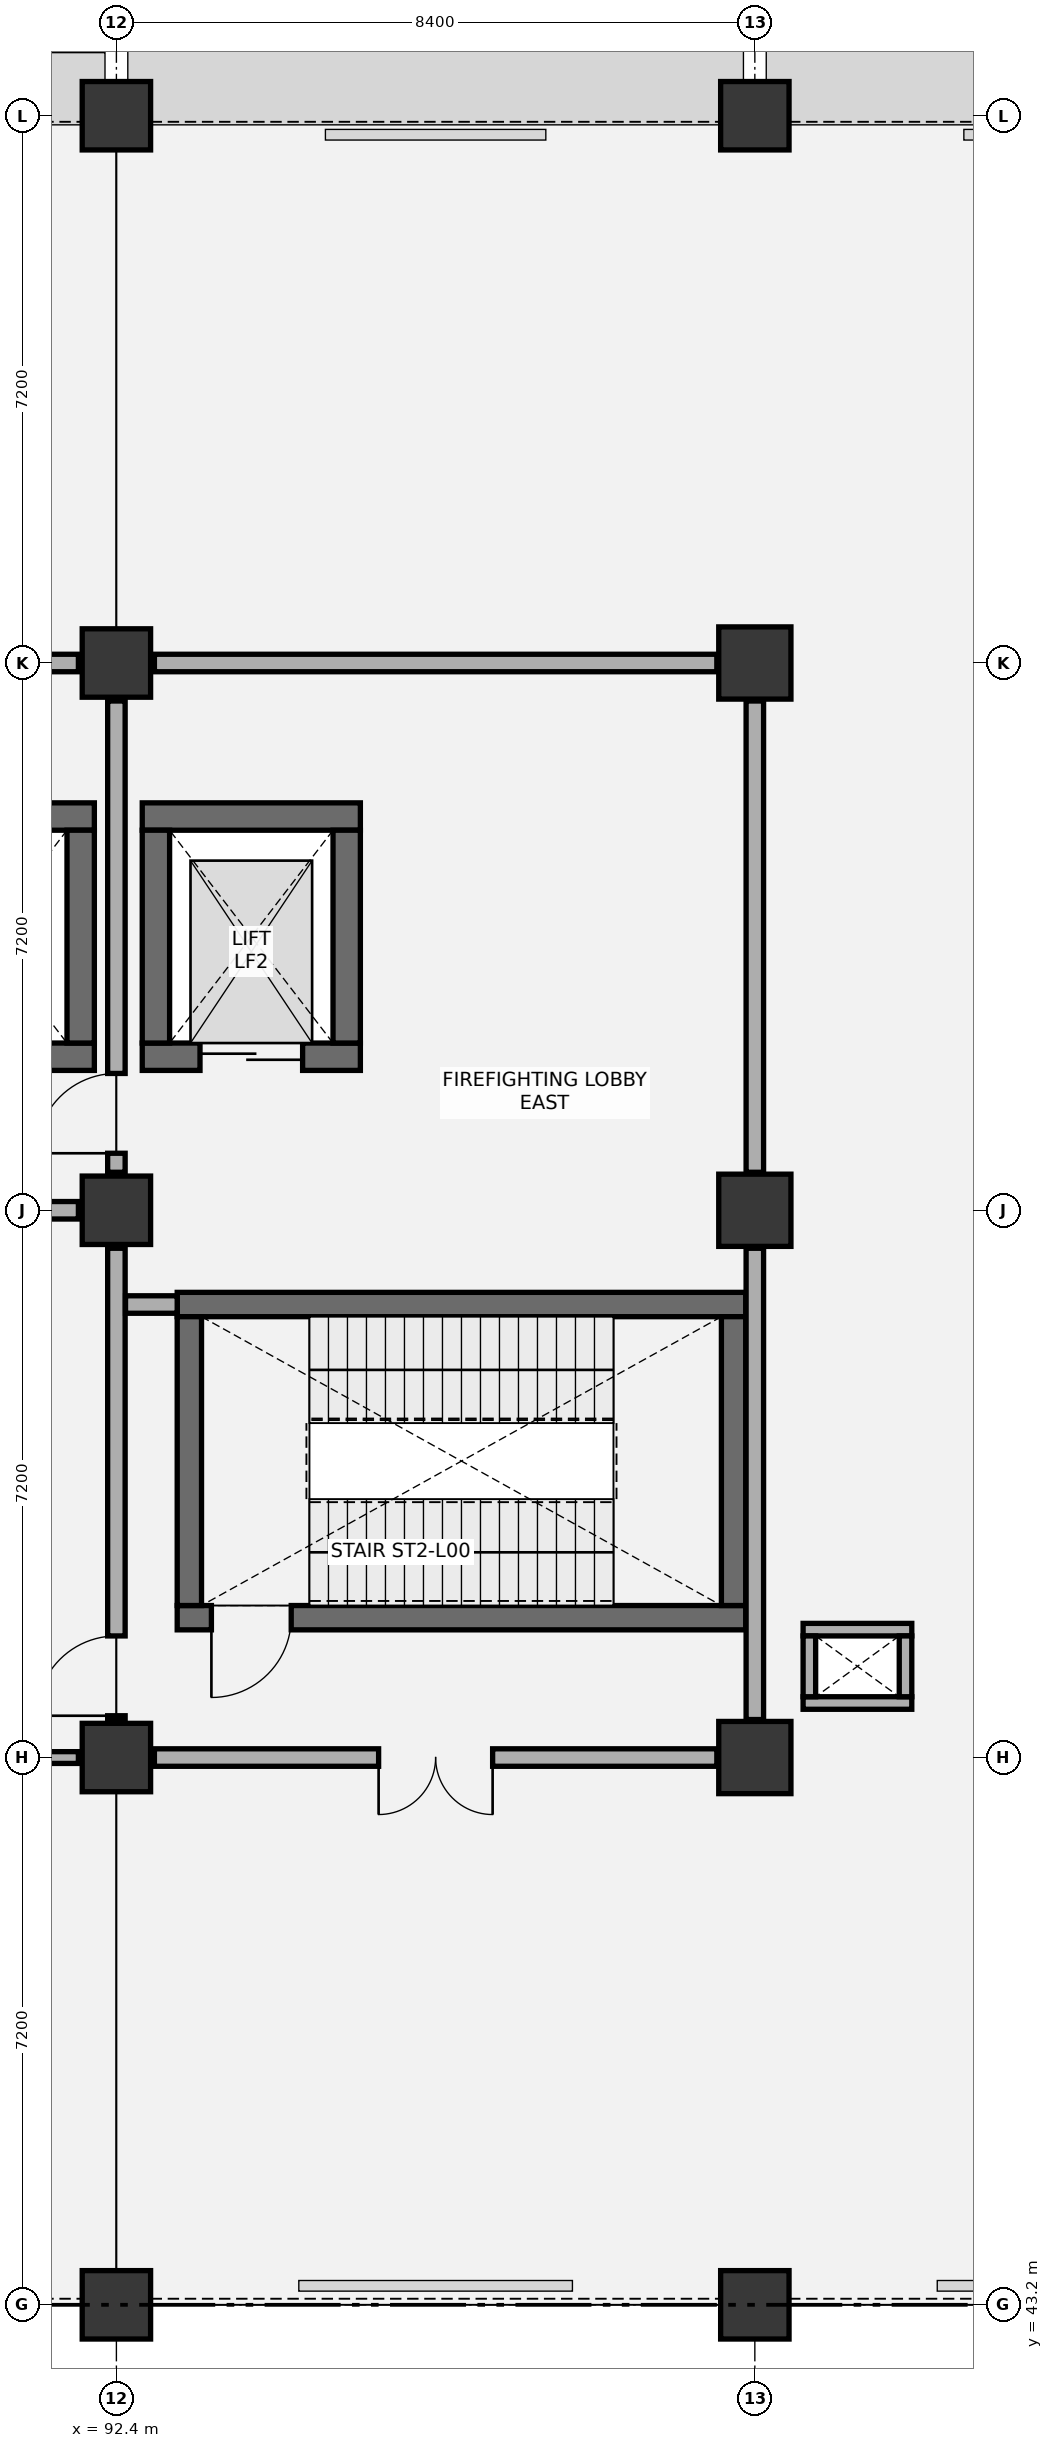
"""IFC4 building model, lengths in metres.
Left out: names, types, materials, properties, quantities, classifications, styles, units other than length and angle.
Written with IfcOpenShell. Run it as: python <this file> out.ifc"""

import sys

from ifc_helpers import new_model, si_unit, direction, frame, frame_2d, origin, origin_2d, place, context, subcontext, project, spatial, rectangle, circle, extrude, element, fill, save


model = new_model("IFC4")
c1 = context("Model", 3, precision=1e-05, world=origin(), true_north=direction((0.0, 1.0)))
c2 = subcontext(c1, "Body", "Model", "MODEL_VIEW")
j1 = project(units=[si_unit("LENGTHUNIT", "METRE"), si_unit("PLANEANGLEUNIT", "RADIAN")], contexts=[c1])
p1 = place(None, origin())
s1 = spatial("IfcSite", under=j1, at=p1, CompositionType="ELEMENT")
p2 = place(p1, origin())
s2 = spatial("IfcBuilding", under=s1, at=p2, CompositionType="ELEMENT")
p3 = place(p2, origin())
s3 = spatial("IfcBuildingStorey", under=s2, at=p3, CompositionType="ELEMENT", Elevation=0.0)
p4 = place(p3, frame((92.4, 43.2, 0.0), z_axis=(0.0, 0.0, 1.0), x_axis=(1.0, 0.0, 0.0)))
e1 = element("IfcColumn", 1, at=p4, inside=s3, PredefinedType="COLUMN", context=c2, shape_type="SweptSolid", body=[
    extrude(circle(Radius=0.45, at=origin_2d()), origin(), (0.0, 0.0, 1.0), 6.0),
])
for number, where, z_axis, x_axis in (
    (2, (92.4, 50.4, 0.0), (0.0, 0.0, 1.0), (1.0, 0.0, 0.0)),
    (3, (92.4, 57.6, 0.0), (0.0, 0.0, 1.0), (1.0, 0.0, 0.0)),
    (4, (92.4, 64.8, 0.0), (0.0, 0.0, 1.0), (1.0, 0.0, 0.0)),
):
    element("IfcColumn", number, at=place(p3, frame(where, z_axis=z_axis, x_axis=x_axis)), inside=s3, PredefinedType="COLUMN", context=c2, shape_type="SweptSolid", body=[
        extrude(rectangle(XDim=0.9, YDim=0.9, at=origin_2d()), origin(), (0.0, 0.0, 1.0), 6.0),
    ])
for number, where, z_axis, x_axis in (
    (5, (92.4, 72.0, 0.0), (0.0, 0.0, 1.0), (1.0, 0.0, 0.0)),
    (6, (100.8, 43.2, 0.0), (0.0, 0.0, 1.0), (1.0, 0.0, 0.0)),
):
    element("IfcColumn", number, at=place(p3, frame(where, z_axis=z_axis, x_axis=x_axis)), inside=s3, PredefinedType="COLUMN", context=c2, shape_type="SweptSolid", body=[
        extrude(circle(Radius=0.45, at=origin_2d()), origin(), (0.0, 0.0, 1.0), 6.0),
    ])
for number, where, z_axis, x_axis in (
    (7, (100.8, 50.4, 0.0), (0.0, 0.0, 1.0), (1.0, 0.0, 0.0)),
    (8, (100.8, 57.6, 0.0), (0.0, 0.0, 1.0), (1.0, 0.0, 0.0)),
    (9, (100.8, 64.8, 0.0), (0.0, 0.0, 1.0), (1.0, 0.0, 0.0)),
):
    element("IfcColumn", number, at=place(p3, frame(where, z_axis=z_axis, x_axis=x_axis)), inside=s3, PredefinedType="COLUMN", context=c2, shape_type="SweptSolid", body=[
        extrude(rectangle(XDim=0.95, YDim=0.95, at=origin_2d()), origin(), (0.0, 0.0, 1.0), 6.0),
    ])
p5 = place(p3, frame((100.8, 72.0, 0.0), z_axis=(0.0, 0.0, 1.0), x_axis=(1.0, 0.0, 0.0)))
e10 = element("IfcColumn", 10, at=p5, inside=s3, PredefinedType="COLUMN", context=c2, shape_type="SweptSolid", body=[
    extrude(circle(Radius=0.45, at=origin_2d()), origin(), (0.0, 0.0, 1.0), 6.0),
])
p6 = place(p3, frame((93.2, 52.24, 0.0), z_axis=(0.0, 0.0, 1.0), x_axis=(1.0, 0.0, 0.0)))
e11 = element("IfcWall", 11, at=p6, inside=s3, PredefinedType="SHEAR", context=c2, shape_type="SweptSolid", body=[
    extrude(rectangle(XDim=7.48, YDim=0.32, at=frame_2d((3.74, 0.0))), origin(), (0.0, 0.0, 1.0), 5.675),
])
p7 = place(p6, frame((0.45, 0.0, 0.0)))
e12 = element("IfcOpeningElement", 12, at=p7, cuts=e11, PredefinedType="OPENING", context=c2, shape_type="SweptSolid", body=[
    extrude(rectangle(XDim=1.05, YDim=2.15, at=frame_2d((0.525, 1.075))), frame((0.0, 0.17, 0.0), z_axis=(0.0, -1.0, 0.0), x_axis=(1.0, 0.0, 0.0)), (0.0, 0.0, 1.0), 0.34),
])
p8 = place(p3, frame((93.2, 56.36, 0.0), z_axis=(0.0, 0.0, 1.0), x_axis=(1.0, 0.0, 0.0)))
e13 = element("IfcWall", 13, at=p8, inside=s3, PredefinedType="SHEAR", context=c2, shape_type="SweptSolid", body=[
    extrude(rectangle(XDim=7.48, YDim=0.32, at=frame_2d((3.74, 0.0))), origin(), (0.0, 0.0, 1.0), 5.675),
])
for number, where, z_axis, x_axis in (
    (14, (93.36, 52.4, 0.0), (0.0, 0.0, 1.0), (0.0, 1.0, 0.0)),
    (15, (100.52, 52.4, 0.0), (0.0, 0.0, 1.0), (0.0, 1.0, 0.0)),
):
    element("IfcWall", number, at=place(p3, frame(where, z_axis=z_axis, x_axis=x_axis)), inside=s3, PredefinedType="SHEAR", context=c2, shape_type="SweptSolid", body=[
        extrude(rectangle(XDim=3.8, YDim=0.32, at=frame_2d((1.9, 0.0))), origin(), (0.0, 0.0, 1.0), 5.675),
    ])
p9 = place(p3, frame((84.34, 62.78, 0.0), z_axis=(0.0, 0.0, 1.0), x_axis=(1.0, 0.0, 0.0)))
e16 = element("IfcWall", 16, at=p9, inside=s3, PredefinedType="SHEAR", context=c2, shape_type="SweptSolid", body=[
    extrude(rectangle(XDim=7.77, YDim=0.36, at=frame_2d((3.885, 0.0))), origin(), (0.0, 0.0, 1.0), 5.675),
])
p10 = place(p3, frame((89.45, 59.62, 0.0), z_axis=(0.0, 0.0, 1.0), x_axis=(1.0, 0.0, 0.0)))
e17 = element("IfcWall", 17, at=p10, inside=s3, PredefinedType="SHEAR", context=c2, shape_type="SweptSolid", body=[
    extrude(rectangle(XDim=2.66, YDim=0.36, at=frame_2d((1.33, 0.0))), origin(), (0.0, 0.0, 1.0), 5.675),
])
p11 = place(p10, frame((0.78, 0.0, 0.0)))
e18 = element("IfcOpeningElement", 18, at=p11, cuts=e17, PredefinedType="OPENING", context=c2, shape_type="SweptSolid", body=[
    extrude(rectangle(XDim=1.1, YDim=2.15, at=frame_2d((0.55, 1.075))), frame((0.0, 0.19, 0.0), z_axis=(0.0, -1.0, 0.0), x_axis=(1.0, 0.0, 0.0)), (0.0, 0.0, 1.0), 0.38),
])
p12 = place(p3, frame((91.93, 59.8, 0.0), z_axis=(0.0, 0.0, 1.0), x_axis=(0.0, 1.0, 0.0)))
e19 = element("IfcWall", 19, at=p12, inside=s3, PredefinedType="SHEAR", context=c2, shape_type="SweptSolid", body=[
    extrude(rectangle(XDim=2.8, YDim=0.36, at=frame_2d((1.4, 0.0))), origin(), (0.0, 0.0, 1.0), 5.675),
])
p13 = place(p3, frame((92.74, 62.78, 0.0), z_axis=(0.0, 0.0, 1.0), x_axis=(1.0, 0.0, 0.0)))
e20 = element("IfcWall", 20, at=p13, inside=s3, PredefinedType="SHEAR", context=c2, shape_type="SweptSolid", body=[
    extrude(rectangle(XDim=2.87, YDim=0.36, at=frame_2d((1.435, 0.0))), origin(), (0.0, 0.0, 1.0), 5.675),
])
p14 = place(p3, frame((92.74, 59.62, 0.0), z_axis=(0.0, 0.0, 1.0), x_axis=(1.0, 0.0, 0.0)))
e21 = element("IfcWall", 21, at=p14, inside=s3, PredefinedType="SHEAR", context=c2, shape_type="SweptSolid", body=[
    extrude(rectangle(XDim=2.87, YDim=0.36, at=frame_2d((1.435, 0.0))), origin(), (0.0, 0.0, 1.0), 5.675),
])
p15 = place(p14, frame((0.76, 0.0, 0.0)))
e22 = element("IfcOpeningElement", 22, at=p15, cuts=e21, PredefinedType="OPENING", context=c2, shape_type="SweptSolid", body=[
    extrude(rectangle(XDim=1.35, YDim=2.2, at=frame_2d((0.675, 1.1))), frame((0.0, 0.19, 0.0), z_axis=(0.0, -1.0, 0.0), x_axis=(1.0, 0.0, 0.0)), (0.0, 0.0, 1.0), 0.38),
])
for number, where, z_axis, x_axis in (
    (23, (92.92, 59.8, 0.0), (0.0, 0.0, 1.0), (0.0, 1.0, 0.0)),
    (24, (95.43, 59.8, 0.0), (0.0, 0.0, 1.0), (0.0, 1.0, 0.0)),
):
    element("IfcWall", number, at=place(p3, frame(where, z_axis=z_axis, x_axis=x_axis)), inside=s3, PredefinedType="SHEAR", context=c2, shape_type="SweptSolid", body=[
        extrude(rectangle(XDim=2.8, YDim=0.36, at=frame_2d((1.4, 0.0))), origin(), (0.0, 0.0, 1.0), 5.675),
    ])
for number, where, z_axis, x_axis in (
    (25, (101.435, 51.117, 0.0), (0.0, 0.0, 1.0), (1.0, 0.0, 0.0)),
    (26, (101.435, 52.083, 0.0), (0.0, 0.0, 1.0), (1.0, 0.0, 0.0)),
):
    element("IfcWall", number, at=place(p3, frame(where, z_axis=z_axis, x_axis=x_axis)), inside=s3, PredefinedType="PARTITIONING", context=c2, shape_type="SweptSolid", body=[
        extrude(rectangle(XDim=1.43, YDim=0.165, at=frame_2d((0.715, 0.0))), origin(), (0.0, 0.0, 1.0), 5.675),
    ])
for number, where, z_axis, x_axis in (
    (27, (101.518, 51.2, 0.0), (0.0, 0.0, 1.0), (0.0, 1.0, 0.0)),
    (28, (102.782, 51.2, 0.0), (0.0, 0.0, 1.0), (0.0, 1.0, 0.0)),
):
    element("IfcWall", number, at=place(p3, frame(where, z_axis=z_axis, x_axis=x_axis)), inside=s3, PredefinedType="PARTITIONING", context=c2, shape_type="SweptSolid", body=[
        extrude(rectangle(XDim=0.8, YDim=0.165, at=frame_2d((0.4, 0.0))), origin(), (0.0, 0.0, 1.0), 5.675),
    ])
p16 = place(p3, frame((84.5, 50.4, 0.0), z_axis=(0.0, 0.0, 1.0), x_axis=(1.0, 0.0, 0.0)))
e29 = element("IfcWall", 29, at=p16, inside=s3, PredefinedType="PARTITIONING", context=c2, shape_type="SweptSolid", body=[
    extrude(rectangle(XDim=7.4, YDim=0.155, at=frame_2d((3.7, 0.0))), origin(), (0.0, 0.0, 1.0), 4.87),
])
p17 = place(p16, frame((3.125, 0.0, 0.0)))
e30 = element("IfcOpeningElement", 30, at=p17, cuts=e29, PredefinedType="OPENING", context=c2, shape_type="SweptSolid", body=[
    extrude(rectangle(XDim=1.15, YDim=2.1, at=frame_2d((0.575, 1.05))), frame((0.0, 0.087, 0.0), z_axis=(0.0, -1.0, 0.0), x_axis=(1.0, 0.0, 0.0)), (0.0, 0.0, 1.0), 0.175),
])
p18 = place(p3, frame((92.4, 50.9, 0.0), z_axis=(0.0, 0.0, 1.0), x_axis=(0.0, 1.0, 0.0)))
e31 = element("IfcWall", 31, at=p18, inside=s3, PredefinedType="PARTITIONING", context=c2, shape_type="SweptSolid", body=[
    extrude(rectangle(XDim=6.2, YDim=0.23, at=frame_2d((3.1, 0.0))), origin(), (0.0, 0.0, 1.0), 5.27),
])
p19 = place(p18, frame((0.05, 0.0, 0.0)))
e32 = element("IfcOpeningElement", 32, at=p19, cuts=e31, PredefinedType="OPENING", context=c2, shape_type="SweptSolid", body=[
    extrude(rectangle(XDim=1.05, YDim=2.15, at=frame_2d((0.525, 1.075))), frame((0.0, 0.125, 0.0), z_axis=(0.0, -1.0, 0.0), x_axis=(1.0, 0.0, 0.0)), (0.0, 0.0, 1.0), 0.25),
])
p20 = place(p3, frame((84.5, 57.6, 0.0), z_axis=(0.0, 0.0, 1.0), x_axis=(1.0, 0.0, 0.0)))
e33 = element("IfcWall", 33, at=p20, inside=s3, PredefinedType="PARTITIONING", context=c2, shape_type="SweptSolid", body=[
    extrude(rectangle(XDim=7.4, YDim=0.23, at=frame_2d((3.7, 0.0))), origin(), (0.0, 0.0, 1.0), 4.87),
])
p21 = place(p20, frame((2.95, 0.0, 0.0)))
e34 = element("IfcOpeningElement", 34, at=p21, cuts=e33, PredefinedType="OPENING", context=c2, shape_type="SweptSolid", body=[
    extrude(rectangle(XDim=1.5, YDim=2.15, at=frame_2d((0.75, 1.075))), frame((0.0, 0.125, 0.0), z_axis=(0.0, -1.0, 0.0), x_axis=(1.0, 0.0, 0.0)), (0.0, 0.0, 1.0), 0.25),
])
p22 = place(p3, frame((92.4, 58.1, 0.0), z_axis=(0.0, 0.0, 1.0), x_axis=(0.0, 1.0, 0.0)))
e35 = element("IfcWall", 35, at=p22, inside=s3, PredefinedType="PARTITIONING", context=c2, shape_type="SweptSolid", body=[
    extrude(rectangle(XDim=6.2, YDim=0.23, at=frame_2d((3.1, 0.0))), origin(), (0.0, 0.0, 1.0), 4.92),
])
p23 = place(p22, frame((0.25, 0.0, 0.0)))
e36 = element("IfcOpeningElement", 36, at=p23, cuts=e35, PredefinedType="OPENING", context=c2, shape_type="SweptSolid", body=[
    extrude(rectangle(XDim=1.05, YDim=2.15, at=frame_2d((0.525, 1.075))), frame((0.0, 0.125, 0.0), z_axis=(0.0, -1.0, 0.0), x_axis=(1.0, 0.0, 0.0)), (0.0, 0.0, 1.0), 0.25),
])
p24 = place(p3, frame((84.5, 64.8, 0.0), z_axis=(0.0, 0.0, 1.0), x_axis=(1.0, 0.0, 0.0)))
e37 = element("IfcWall", 37, at=p24, inside=s3, PredefinedType="PARTITIONING", context=c2, shape_type="SweptSolid", body=[
    extrude(rectangle(XDim=7.4, YDim=0.23, at=frame_2d((3.7, 0.0))), origin(), (0.0, 0.0, 1.0), 4.87),
])
p25 = place(p3, frame((92.9, 50.4, 0.0), z_axis=(0.0, 0.0, 1.0), x_axis=(1.0, 0.0, 0.0)))
e38 = element("IfcWall", 38, at=p25, inside=s3, PredefinedType="PARTITIONING", context=c2, shape_type="SweptSolid", body=[
    extrude(rectangle(XDim=7.4, YDim=0.23, at=frame_2d((3.7, 0.0))), origin(), (0.0, 0.0, 1.0), 4.87),
])
p26 = place(p25, frame((2.95, 0.0, 0.0)))
e39 = element("IfcOpeningElement", 39, at=p26, cuts=e38, PredefinedType="OPENING", context=c2, shape_type="SweptSolid", body=[
    extrude(rectangle(XDim=1.5, YDim=2.15, at=frame_2d((0.75, 1.075))), frame((0.0, 0.125, 0.0), z_axis=(0.0, -1.0, 0.0), x_axis=(1.0, 0.0, 0.0)), (0.0, 0.0, 1.0), 0.25),
])
p27 = place(p3, frame((100.8, 50.9, 0.0), z_axis=(0.0, 0.0, 1.0), x_axis=(0.0, 1.0, 0.0)))
e40 = element("IfcWall", 40, at=p27, inside=s3, PredefinedType="PARTITIONING", context=c2, shape_type="SweptSolid", body=[
    extrude(rectangle(XDim=6.2, YDim=0.23, at=frame_2d((3.1, 0.0))), origin(), (0.0, 0.0, 1.0), 4.92),
])
p28 = place(p3, frame((92.52, 56.36, 0.0), z_axis=(0.0, 0.0, 1.0), x_axis=(1.0, 0.0, 0.0)))
e41 = element("IfcWall", 41, at=p28, inside=s3, PredefinedType="PARTITIONING", context=c2, shape_type="SweptSolid", body=[
    extrude(rectangle(XDim=0.68, YDim=0.23, at=frame_2d((0.34, 0.0))), origin(), (0.0, 0.0, 1.0), 5.675),
])
p29 = place(p3, frame((100.8, 58.1, 0.0), z_axis=(0.0, 0.0, 1.0), x_axis=(0.0, 1.0, 0.0)))
e42 = element("IfcWall", 42, at=p29, inside=s3, PredefinedType="PARTITIONING", context=c2, shape_type="SweptSolid", body=[
    extrude(rectangle(XDim=6.2, YDim=0.23, at=frame_2d((3.1, 0.0))), origin(), (0.0, 0.0, 1.0), 5.38),
])
p30 = place(p3, frame((92.9, 64.8, 0.0), z_axis=(0.0, 0.0, 1.0), x_axis=(1.0, 0.0, 0.0)))
e43 = element("IfcWall", 43, at=p30, inside=s3, PredefinedType="PARTITIONING", context=c2, shape_type="SweptSolid", body=[
    extrude(rectangle(XDim=7.4, YDim=0.23, at=frame_2d((3.7, 0.0))), origin(), (0.0, 0.0, 1.0), 4.87),
])
p31 = place(p7, frame((1.05, 0.0, 0.0), z_axis=(0.0, 0.0, 1.0), x_axis=(-1.0, 0.0, 0.0)))
e44 = element("IfcDoor", 44, at=p31, inside=s3, OperationType="SINGLE_SWING_RIGHT", PredefinedType="DOOR", context=c2, shape_type="SweptSolid", body=[
    extrude(rectangle(XDim=1.05, YDim=2.15, at=frame_2d((0.525, 1.075))), frame((0.0, 0.025, 0.0), z_axis=(0.0, -1.0, 0.0), x_axis=(1.0, 0.0, 0.0)), (0.0, 0.0, 1.0), 0.05),
])
fill(e12, e44)
p32 = place(p15, origin())
e45 = element("IfcDoor", 45, at=p32, inside=s3, OperationType="DOUBLE_DOOR_SLIDING", PredefinedType="DOOR", context=c2, shape_type="SweptSolid", body=[
    extrude(rectangle(XDim=1.35, YDim=2.2, at=frame_2d((0.675, 1.1))), frame((0.0, 0.025, 0.0), z_axis=(0.0, -1.0, 0.0), x_axis=(1.0, 0.0, 0.0)), (0.0, 0.0, 1.0), 0.05),
])
fill(e22, e45)
p33 = place(p19, origin())
e46 = element("IfcDoor", 46, at=p33, inside=s3, OperationType="SINGLE_SWING_LEFT", PredefinedType="DOOR", context=c2, shape_type="SweptSolid", body=[
    extrude(rectangle(XDim=1.05, YDim=2.15, at=frame_2d((0.525, 1.075))), frame((0.0, 0.025, 0.0), z_axis=(0.0, -1.0, 0.0), x_axis=(1.0, 0.0, 0.0)), (0.0, 0.0, 1.0), 0.05),
])
fill(e32, e46)
p34 = place(p23, origin())
e47 = element("IfcDoor", 47, at=p34, inside=s3, OperationType="SINGLE_SWING_LEFT", PredefinedType="DOOR", context=c2, shape_type="SweptSolid", body=[
    extrude(rectangle(XDim=1.05, YDim=2.15, at=frame_2d((0.525, 1.075))), frame((0.0, 0.025, 0.0), z_axis=(0.0, -1.0, 0.0), x_axis=(1.0, 0.0, 0.0)), (0.0, 0.0, 1.0), 0.05),
])
fill(e36, e47)
p35 = place(p26, frame((1.5, 0.0, 0.0), z_axis=(0.0, 0.0, 1.0), x_axis=(-1.0, 0.0, 0.0)))
e48 = element("IfcDoor", 48, at=p35, inside=s3, OperationType="DOUBLE_DOOR_SINGLE_SWING", PredefinedType="DOOR", context=c2, shape_type="SweptSolid", body=[
    extrude(rectangle(XDim=1.5, YDim=2.15, at=frame_2d((0.75, 1.075))), frame((0.0, 0.025, 0.0), z_axis=(0.0, -1.0, 0.0), x_axis=(1.0, 0.0, 0.0)), (0.0, 0.0, 1.0), 0.05),
])
fill(e39, e48)
save(model, sys.argv[1])
